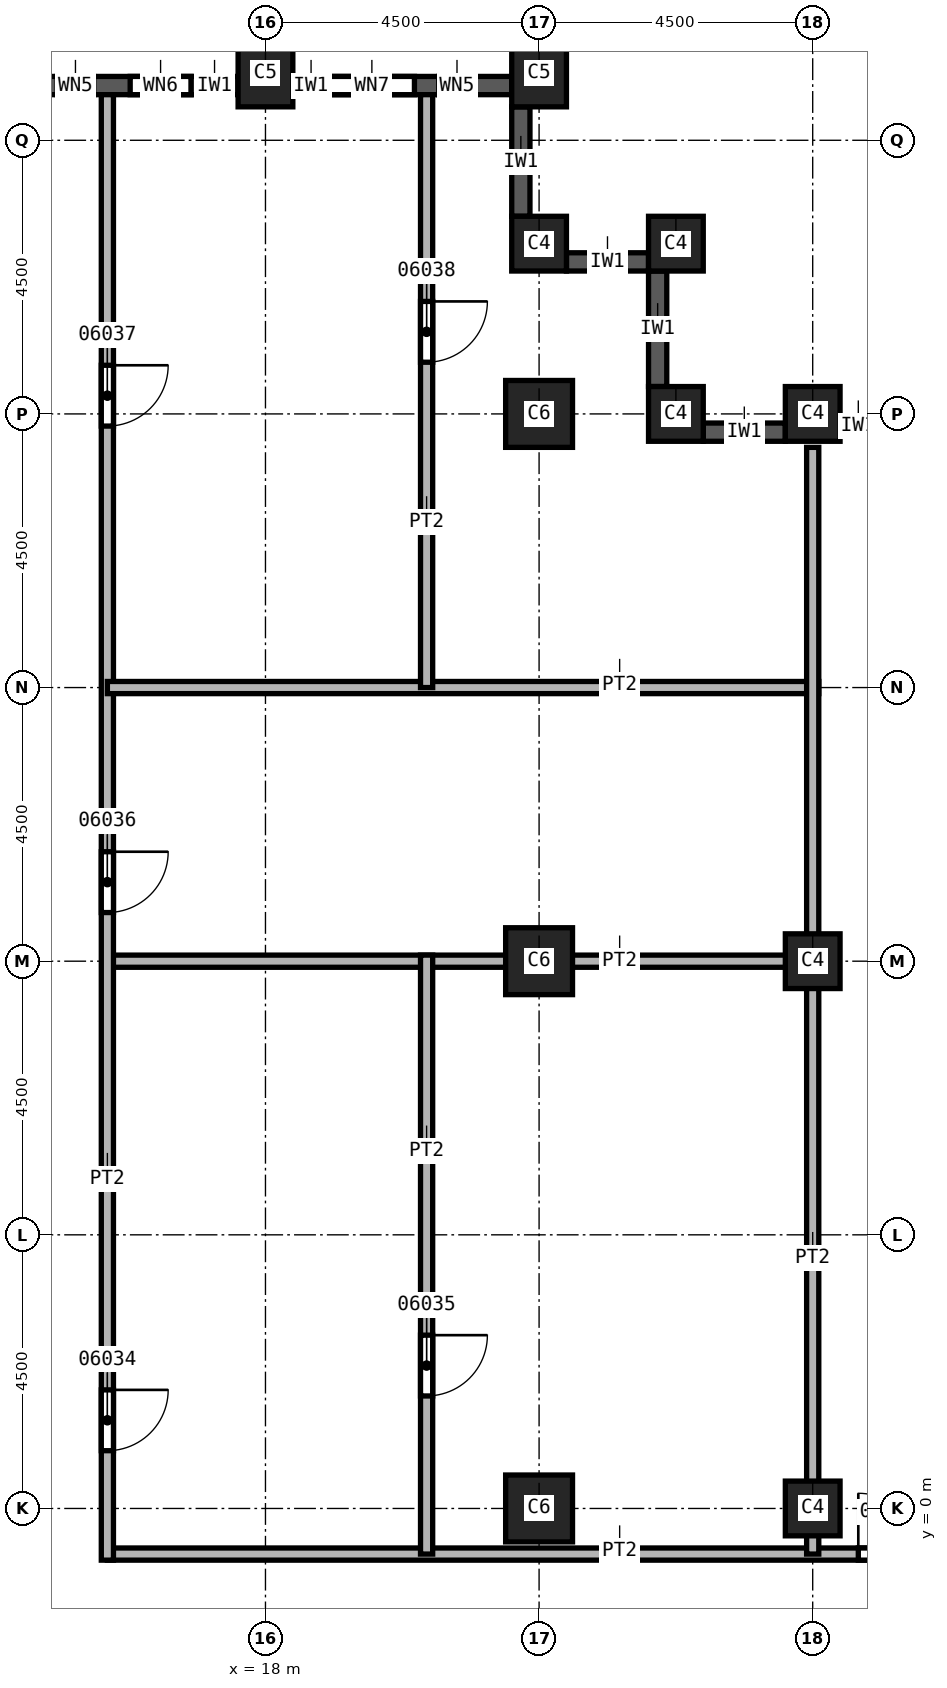
"""IFC4 building model, lengths in metres.
Left out: names, types, materials, properties, quantities, classifications, styles, units other than length and angle.
Written with IfcOpenShell. Run it as: python <this file> out.ifc"""

import sys

from ifc_helpers import new_model, si_unit, direction, frame, frame_2d, origin, origin_2d, place, context, subcontext, project, spatial, rectangle, extrude, element, fill, save


model = new_model("IFC4")
c1 = context("Model", 3, precision=1e-05, world=origin(), true_north=direction((0.0, 1.0)))
c2 = subcontext(c1, "Body", "Model", "MODEL_VIEW")
j1 = project(units=[si_unit("LENGTHUNIT", "METRE"), si_unit("PLANEANGLEUNIT", "RADIAN")], contexts=[c1])
p1 = place(None, origin())
s1 = spatial("IfcSite", under=j1, at=p1, CompositionType="ELEMENT")
p2 = place(p1, origin())
s2 = spatial("IfcBuilding", under=s1, at=p2, CompositionType="ELEMENT")
p3 = place(p2, frame((0.0, 0.0, 130.0)))
s3 = spatial("IfcBuildingStorey", under=s2, at=p3, CompositionType="ELEMENT", Elevation=130.0)
for number, where, z_axis, x_axis in (
    (1, (22.5, 0.0, 0.0), (0.0, 0.0, 1.0), (1.0, 0.0, 0.0)),
    (2, (22.5, 9.0, 0.0), (0.0, 0.0, 1.0), (1.0, 0.0, 0.0)),
    (3, (22.5, 18.0, 0.0), (0.0, 0.0, 1.0), (1.0, 0.0, 0.0)),
):
    element("IfcColumn", number, at=place(p3, frame(where, z_axis=z_axis, x_axis=x_axis)), inside=s3, PredefinedType="COLUMN", context=c2, shape_type="SweptSolid", body=[
        extrude(rectangle(XDim=1.1, YDim=1.1, at=origin_2d()), origin(), (0.0, 0.0, 1.0), 3.7),
    ])
for number, where, z_axis, x_axis in (
    (4, (27.0, 0.0, 0.0), (0.0, 0.0, 1.0), (1.0, 0.0, 0.0)),
    (5, (27.0, 9.0, 0.0), (0.0, 0.0, 1.0), (1.0, 0.0, 0.0)),
    (6, (27.0, 18.0, 0.0), (0.0, 0.0, 1.0), (1.0, 0.0, 0.0)),
):
    element("IfcColumn", number, at=place(p3, frame(where, z_axis=z_axis, x_axis=x_axis)), inside=s3, PredefinedType="COLUMN", context=c2, shape_type="SweptSolid", body=[
        extrude(rectangle(XDim=0.9, YDim=0.9, at=origin_2d()), origin(), (0.0, 0.0, 1.0), 3.7),
    ])
for number, where, z_axis, x_axis in (
    (7, (18.0, 23.6, 0.0), (0.0, 0.0, 1.0), (1.0, 0.0, 0.0)),
    (8, (22.5, 23.6, 0.0), (0.0, 0.0, 1.0), (1.0, 0.0, 0.0)),
):
    element("IfcColumn", number, at=place(p3, frame(where, z_axis=z_axis, x_axis=x_axis)), inside=s3, PredefinedType="COLUMN", context=c2, shape_type="SweptSolid", body=[
        extrude(rectangle(XDim=0.9, YDim=1.1, at=origin_2d()), origin(), (0.0, 0.0, 1.0), 3.7),
    ])
for number, where, z_axis, x_axis in (
    (9, (22.5, 20.8, 0.0), (0.0, 0.0, 1.0), (1.0, 0.0, 0.0)),
    (10, (24.75, 20.8, 0.0), (0.0, 0.0, 1.0), (1.0, 0.0, 0.0)),
    (11, (24.75, 18.0, 0.0), (0.0, 0.0, 1.0), (1.0, 0.0, 0.0)),
):
    element("IfcColumn", number, at=place(p3, frame(where, z_axis=z_axis, x_axis=x_axis)), inside=s3, PredefinedType="COLUMN", context=c2, shape_type="SweptSolid", body=[
        extrude(rectangle(XDim=0.9, YDim=0.9, at=origin_2d()), origin(), (0.0, 0.0, 1.0), 3.7),
    ])
p4 = place(p3, frame((31.05, 17.8, 0.0), z_axis=(0.0, 0.0, 1.0), x_axis=(-1.0, 0.0, 0.0)))
e12 = element("IfcWall", 12, at=p4, inside=s3, PredefinedType="SOLIDWALL", context=c2, shape_type="SweptSolid", body=[
    extrude(rectangle(XDim=3.6, YDim=0.3, at=frame_2d((1.8, 0.0))), origin(), (0.0, 0.0, 1.0), 3.1),
])
p5 = place(p4, frame((0.6, 0.0, 0.8)))
e13 = element("IfcOpeningElement", 13, at=p5, cuts=e12, PredefinedType="OPENING", context=c2, shape_type="SweptSolid", body=[
    extrude(rectangle(XDim=2.4, YDim=1.95, at=frame_2d((1.2, 0.975))), frame((0.0, 0.15, 0.0), z_axis=(0.0, -1.0, 0.0), x_axis=(1.0, 0.0, 0.0)), (0.0, 0.0, 1.0), 0.3),
])
p6 = place(p3, frame((26.55, 17.7, 0.0), z_axis=(0.0, 0.0, 1.0), x_axis=(-1.0, 0.0, 0.0)))
e14 = element("IfcWall", 14, at=p6, inside=s3, PredefinedType="SOLIDWALL", context=c2, shape_type="SweptSolid", body=[
    extrude(rectangle(XDim=1.35, YDim=0.3, at=frame_2d((0.675, 0.0))), origin(), (0.0, 0.0, 1.0), 3.1),
])
p7 = place(p3, frame((24.45, 18.45, 0.0), z_axis=(0.0, 0.0, 1.0), x_axis=(0.0, 1.0, 0.0)))
e15 = element("IfcWall", 15, at=p7, inside=s3, PredefinedType="SOLIDWALL", context=c2, shape_type="SweptSolid", body=[
    extrude(rectangle(XDim=1.9, YDim=0.3, at=frame_2d((0.95, 0.0))), origin(), (0.0, 0.0, 1.0), 3.1),
])
p8 = place(p3, frame((24.3, 20.5, 0.0), z_axis=(0.0, 0.0, 1.0), x_axis=(-1.0, 0.0, 0.0)))
e16 = element("IfcWall", 16, at=p8, inside=s3, PredefinedType="SOLIDWALL", context=c2, shape_type="SweptSolid", body=[
    extrude(rectangle(XDim=1.35, YDim=0.3, at=frame_2d((0.675, 0.0))), origin(), (0.0, 0.0, 1.0), 3.1),
])
p9 = place(p3, frame((22.2, 21.25, 0.0), z_axis=(0.0, 0.0, 1.0), x_axis=(0.0, 1.0, 0.0)))
e17 = element("IfcWall", 17, at=p9, inside=s3, PredefinedType="SOLIDWALL", context=c2, shape_type="SweptSolid", body=[
    extrude(rectangle(XDim=1.8, YDim=0.3, at=frame_2d((0.9, 0.0))), origin(), (0.0, 0.0, 1.0), 3.1),
])
p10 = place(p3, frame((22.05, 23.4, 0.0), z_axis=(0.0, 0.0, 1.0), x_axis=(-1.0, 0.0, 0.0)))
e18 = element("IfcWall", 18, at=p10, inside=s3, PredefinedType="SOLIDWALL", context=c2, shape_type="SweptSolid", body=[
    extrude(rectangle(XDim=3.6, YDim=0.3, at=frame_2d((1.8, 0.0))), origin(), (0.0, 0.0, 1.0), 3.1),
])
p11 = place(p10, frame((0.6, 0.0, 0.8)))
e19 = element("IfcOpeningElement", 19, at=p11, cuts=e18, PredefinedType="OPENING", context=c2, shape_type="SweptSolid", body=[
    extrude(rectangle(XDim=0.6, YDim=1.95, at=frame_2d((0.3, 0.975))), frame((0.0, 0.15, 0.0), z_axis=(0.0, -1.0, 0.0), x_axis=(1.0, 0.0, 0.0)), (0.0, 0.0, 1.0), 0.3),
])
p12 = place(p10, frame((1.6, 0.0, 0.8)))
e20 = element("IfcOpeningElement", 20, at=p12, cuts=e18, PredefinedType="OPENING", context=c2, shape_type="SweptSolid", body=[
    extrude(rectangle(XDim=1.4, YDim=1.95, at=frame_2d((0.7, 0.975))), frame((0.0, 0.15, 0.0), z_axis=(0.0, -1.0, 0.0), x_axis=(1.0, 0.0, 0.0)), (0.0, 0.0, 1.0), 0.3),
])
p13 = place(p3, frame((17.55, 23.4, 0.0), z_axis=(0.0, 0.0, 1.0), x_axis=(-1.0, 0.0, 0.0)))
e21 = element("IfcWall", 21, at=p13, inside=s3, PredefinedType="SOLIDWALL", context=c2, shape_type="SweptSolid", body=[
    extrude(rectangle(XDim=3.6, YDim=0.3, at=frame_2d((1.8, 0.0))), origin(), (0.0, 0.0, 1.0), 3.1),
])
p14 = place(p13, frame((0.775, 0.0, 0.8)))
e22 = element("IfcOpeningElement", 22, at=p14, cuts=e21, PredefinedType="OPENING", context=c2, shape_type="SweptSolid", body=[
    extrude(rectangle(XDim=1.0, YDim=1.95, at=frame_2d((0.5, 0.975))), frame((0.0, 0.15, 0.0), z_axis=(0.0, -1.0, 0.0), x_axis=(1.0, 0.0, 0.0)), (0.0, 0.0, 1.0), 0.3),
])
p15 = place(p13, frame((2.375, 0.0, 0.8)))
e23 = element("IfcOpeningElement", 23, at=p15, cuts=e21, PredefinedType="OPENING", context=c2, shape_type="SweptSolid", body=[
    extrude(rectangle(XDim=0.6, YDim=1.95, at=frame_2d((0.3, 0.975))), frame((0.0, 0.15, 0.0), z_axis=(0.0, -1.0, 0.0), x_axis=(1.0, 0.0, 0.0)), (0.0, 0.0, 1.0), 0.3),
])
p16 = place(p3, frame((15.4, -0.75, 0.0), z_axis=(0.0, 0.0, 1.0), x_axis=(1.0, 0.0, 0.0)))
e24 = element("IfcWall", 24, at=p16, inside=s3, PredefinedType="PARTITIONING", context=c2, shape_type="SweptSolid", body=[
    extrude(rectangle(XDim=18.45, YDim=0.2, at=frame_2d((9.225, 0.0))), origin(), (0.0, 0.0, 1.0), 3.7),
])
p17 = place(p16, frame((12.35, 0.0, 0.0)))
e25 = element("IfcOpeningElement", 25, at=p17, cuts=e24, PredefinedType="OPENING", context=c2, shape_type="SweptSolid", body=[
    extrude(rectangle(XDim=1.0, YDim=2.1, at=frame_2d((0.5, 1.05))), frame((0.0, 0.1, 0.0), z_axis=(0.0, -1.0, 0.0), x_axis=(1.0, 0.0, 0.0)), (0.0, 0.0, 1.0), 0.2),
])
p18 = place(p3, frame((15.4, 9.0, 0.0), z_axis=(0.0, 0.0, 1.0), x_axis=(1.0, 0.0, 0.0)))
e26 = element("IfcWall", 26, at=p18, inside=s3, PredefinedType="PARTITIONING", context=c2, shape_type="SweptSolid", body=[
    extrude(rectangle(XDim=11.7, YDim=0.2, at=frame_2d((5.85, 0.0))), origin(), (0.0, 0.0, 1.0), 3.7),
])
p19 = place(p3, frame((15.4, 23.25, 0.0), z_axis=(0.0, 0.0, 1.0), x_axis=(0.0, -1.0, 0.0)))
e27 = element("IfcWall", 27, at=p19, inside=s3, PredefinedType="PARTITIONING", context=c2, shape_type="SweptSolid", body=[
    extrude(rectangle(XDim=24.1, YDim=0.2, at=frame_2d((12.05, 0.0))), origin(), (0.0, 0.0, 1.0), 3.7),
])
p20 = place(p19, frame((21.3, 0.0, 0.0)))
e28 = element("IfcOpeningElement", 28, at=p20, cuts=e27, PredefinedType="OPENING", context=c2, shape_type="SweptSolid", body=[
    extrude(rectangle(XDim=1.0, YDim=2.1, at=frame_2d((0.5, 1.05))), frame((0.0, 0.1, 0.0), z_axis=(0.0, -1.0, 0.0), x_axis=(1.0, 0.0, 0.0)), (0.0, 0.0, 1.0), 0.2),
])
p21 = place(p19, frame((12.45, 0.0, 0.0)))
e29 = element("IfcOpeningElement", 29, at=p21, cuts=e27, PredefinedType="OPENING", context=c2, shape_type="SweptSolid", body=[
    extrude(rectangle(XDim=1.0, YDim=2.1, at=frame_2d((0.5, 1.05))), frame((0.0, 0.1, 0.0), z_axis=(0.0, -1.0, 0.0), x_axis=(1.0, 0.0, 0.0)), (0.0, 0.0, 1.0), 0.2),
])
p22 = place(p19, frame((4.45, 0.0, 0.0)))
e30 = element("IfcOpeningElement", 30, at=p22, cuts=e27, PredefinedType="OPENING", context=c2, shape_type="SweptSolid", body=[
    extrude(rectangle(XDim=1.0, YDim=2.1, at=frame_2d((0.5, 1.05))), frame((0.0, 0.1, 0.0), z_axis=(0.0, -1.0, 0.0), x_axis=(1.0, 0.0, 0.0)), (0.0, 0.0, 1.0), 0.2),
])
p23 = place(p3, frame((15.4, 13.5, 0.0), z_axis=(0.0, 0.0, 1.0), x_axis=(1.0, 0.0, 0.0)))
e31 = element("IfcWall", 31, at=p23, inside=s3, PredefinedType="PARTITIONING", context=c2, shape_type="SweptSolid", body=[
    extrude(rectangle(XDim=11.7, YDim=0.2, at=frame_2d((5.85, 0.0))), origin(), (0.0, 0.0, 1.0), 3.7),
])
p24 = place(p3, frame((20.65, 9.1, 0.0), z_axis=(0.0, 0.0, 1.0), x_axis=(0.0, -1.0, 0.0)))
e32 = element("IfcWall", 32, at=p24, inside=s3, PredefinedType="PARTITIONING", context=c2, shape_type="SweptSolid", body=[
    extrude(rectangle(XDim=9.85, YDim=0.2, at=frame_2d((4.925, 0.0))), origin(), (0.0, 0.0, 1.0), 3.7),
])
p25 = place(p24, frame((6.25, 0.0, 0.0)))
e33 = element("IfcOpeningElement", 33, at=p25, cuts=e32, PredefinedType="OPENING", context=c2, shape_type="SweptSolid", body=[
    extrude(rectangle(XDim=1.0, YDim=2.1, at=frame_2d((0.5, 1.05))), frame((0.0, 0.1, 0.0), z_axis=(0.0, -1.0, 0.0), x_axis=(1.0, 0.0, 0.0)), (0.0, 0.0, 1.0), 0.2),
])
p26 = place(p3, frame((20.65, 23.25, 0.0), z_axis=(0.0, 0.0, 1.0), x_axis=(0.0, -1.0, 0.0)))
e34 = element("IfcWall", 34, at=p26, inside=s3, PredefinedType="PARTITIONING", context=c2, shape_type="SweptSolid", body=[
    extrude(rectangle(XDim=9.75, YDim=0.2, at=frame_2d((4.875, 0.0))), origin(), (0.0, 0.0, 1.0), 3.7),
])
p27 = place(p26, frame((3.4, 0.0, 0.0)))
e35 = element("IfcOpeningElement", 35, at=p27, cuts=e34, PredefinedType="OPENING", context=c2, shape_type="SweptSolid", body=[
    extrude(rectangle(XDim=1.0, YDim=2.1, at=frame_2d((0.5, 1.05))), frame((0.0, 0.1, 0.0), z_axis=(0.0, -1.0, 0.0), x_axis=(1.0, 0.0, 0.0)), (0.0, 0.0, 1.0), 0.2),
])
p28 = place(p3, frame((27.0, 17.45, 0.0), z_axis=(0.0, 0.0, 1.0), x_axis=(0.0, -1.0, 0.0)))
e36 = element("IfcWall", 36, at=p28, inside=s3, PredefinedType="PARTITIONING", context=c2, shape_type="SweptSolid", body=[
    extrude(rectangle(XDim=18.2, YDim=0.2, at=frame_2d((9.1, 0.0))), origin(), (0.0, 0.0, 1.0), 3.7),
])
p29 = place(p20, origin())
e37 = element("IfcDoor", 37, at=p29, inside=s3, OperationType="SINGLE_SWING_LEFT", PredefinedType="DOOR", context=c2, shape_type="SweptSolid", body=[
    extrude(rectangle(XDim=1.0, YDim=2.1, at=frame_2d((0.5, 1.05))), frame((0.0, 0.025, 0.0), z_axis=(0.0, -1.0, 0.0), x_axis=(1.0, 0.0, 0.0)), (0.0, 0.0, 1.0), 0.05),
])
fill(e28, e37)
p30 = place(p25, origin())
e38 = element("IfcDoor", 38, at=p30, inside=s3, OperationType="SINGLE_SWING_RIGHT", PredefinedType="DOOR", context=c2, shape_type="SweptSolid", body=[
    extrude(rectangle(XDim=1.0, YDim=2.1, at=frame_2d((0.5, 1.05))), frame((0.0, 0.025, 0.0), z_axis=(0.0, -1.0, 0.0), x_axis=(1.0, 0.0, 0.0)), (0.0, 0.0, 1.0), 0.05),
])
fill(e33, e38)
p31 = place(p21, origin())
e39 = element("IfcDoor", 39, at=p31, inside=s3, OperationType="SINGLE_SWING_LEFT", PredefinedType="DOOR", context=c2, shape_type="SweptSolid", body=[
    extrude(rectangle(XDim=1.0, YDim=2.1, at=frame_2d((0.5, 1.05))), frame((0.0, 0.025, 0.0), z_axis=(0.0, -1.0, 0.0), x_axis=(1.0, 0.0, 0.0)), (0.0, 0.0, 1.0), 0.05),
])
fill(e29, e39)
p32 = place(p22, origin())
e40 = element("IfcDoor", 40, at=p32, inside=s3, OperationType="SINGLE_SWING_RIGHT", PredefinedType="DOOR", context=c2, shape_type="SweptSolid", body=[
    extrude(rectangle(XDim=1.0, YDim=2.1, at=frame_2d((0.5, 1.05))), frame((0.0, 0.025, 0.0), z_axis=(0.0, -1.0, 0.0), x_axis=(1.0, 0.0, 0.0)), (0.0, 0.0, 1.0), 0.05),
])
fill(e30, e40)
p33 = place(p27, origin())
e41 = element("IfcDoor", 41, at=p33, inside=s3, OperationType="SINGLE_SWING_LEFT", PredefinedType="DOOR", context=c2, shape_type="SweptSolid", body=[
    extrude(rectangle(XDim=1.0, YDim=2.1, at=frame_2d((0.5, 1.05))), frame((0.0, 0.025, 0.0), z_axis=(0.0, -1.0, 0.0), x_axis=(1.0, 0.0, 0.0)), (0.0, 0.0, 1.0), 0.05),
])
fill(e35, e41)
p34 = place(p17, origin())
e42 = element("IfcDoor", 42, at=p34, inside=s3, OperationType="SINGLE_SWING_LEFT", PredefinedType="DOOR", context=c2, shape_type="SweptSolid", body=[
    extrude(rectangle(XDim=1.0, YDim=2.1, at=frame_2d((0.5, 1.05))), frame((0.0, 0.025, 0.0), z_axis=(0.0, -1.0, 0.0), x_axis=(1.0, 0.0, 0.0)), (0.0, 0.0, 1.0), 0.05),
])
fill(e25, e42)
p35 = place(p11, origin())
e43 = element("IfcWindow", 43, at=p35, inside=s3, PartitioningType="SINGLE_PANEL", PredefinedType="WINDOW", context=c2, shape_type="SweptSolid", body=[
    extrude(rectangle(XDim=0.6, YDim=1.95, at=frame_2d((0.3, 0.975))), frame((0.0, 0.03, 0.0), z_axis=(0.0, -1.0, 0.0), x_axis=(1.0, 0.0, 0.0)), (0.0, 0.0, 1.0), 0.06),
])
fill(e19, e43)
p36 = place(p12, origin())
e44 = element("IfcWindow", 44, at=p36, inside=s3, PartitioningType="SINGLE_PANEL", PredefinedType="WINDOW", context=c2, shape_type="SweptSolid", body=[
    extrude(rectangle(XDim=1.4, YDim=1.95, at=frame_2d((0.7, 0.975))), frame((0.0, 0.03, 0.0), z_axis=(0.0, -1.0, 0.0), x_axis=(1.0, 0.0, 0.0)), (0.0, 0.0, 1.0), 0.06),
])
fill(e20, e44)
p37 = place(p14, origin())
e45 = element("IfcWindow", 45, at=p37, inside=s3, PartitioningType="SINGLE_PANEL", PredefinedType="WINDOW", context=c2, shape_type="SweptSolid", body=[
    extrude(rectangle(XDim=1.0, YDim=1.95, at=frame_2d((0.5, 0.975))), frame((0.0, 0.03, 0.0), z_axis=(0.0, -1.0, 0.0), x_axis=(1.0, 0.0, 0.0)), (0.0, 0.0, 1.0), 0.06),
])
fill(e22, e45)
p38 = place(p15, origin())
e46 = element("IfcWindow", 46, at=p38, inside=s3, PartitioningType="SINGLE_PANEL", PredefinedType="WINDOW", context=c2, shape_type="SweptSolid", body=[
    extrude(rectangle(XDim=0.6, YDim=1.95, at=frame_2d((0.3, 0.975))), frame((0.0, 0.03, 0.0), z_axis=(0.0, -1.0, 0.0), x_axis=(1.0, 0.0, 0.0)), (0.0, 0.0, 1.0), 0.06),
])
fill(e23, e46)
save(model, sys.argv[1])
